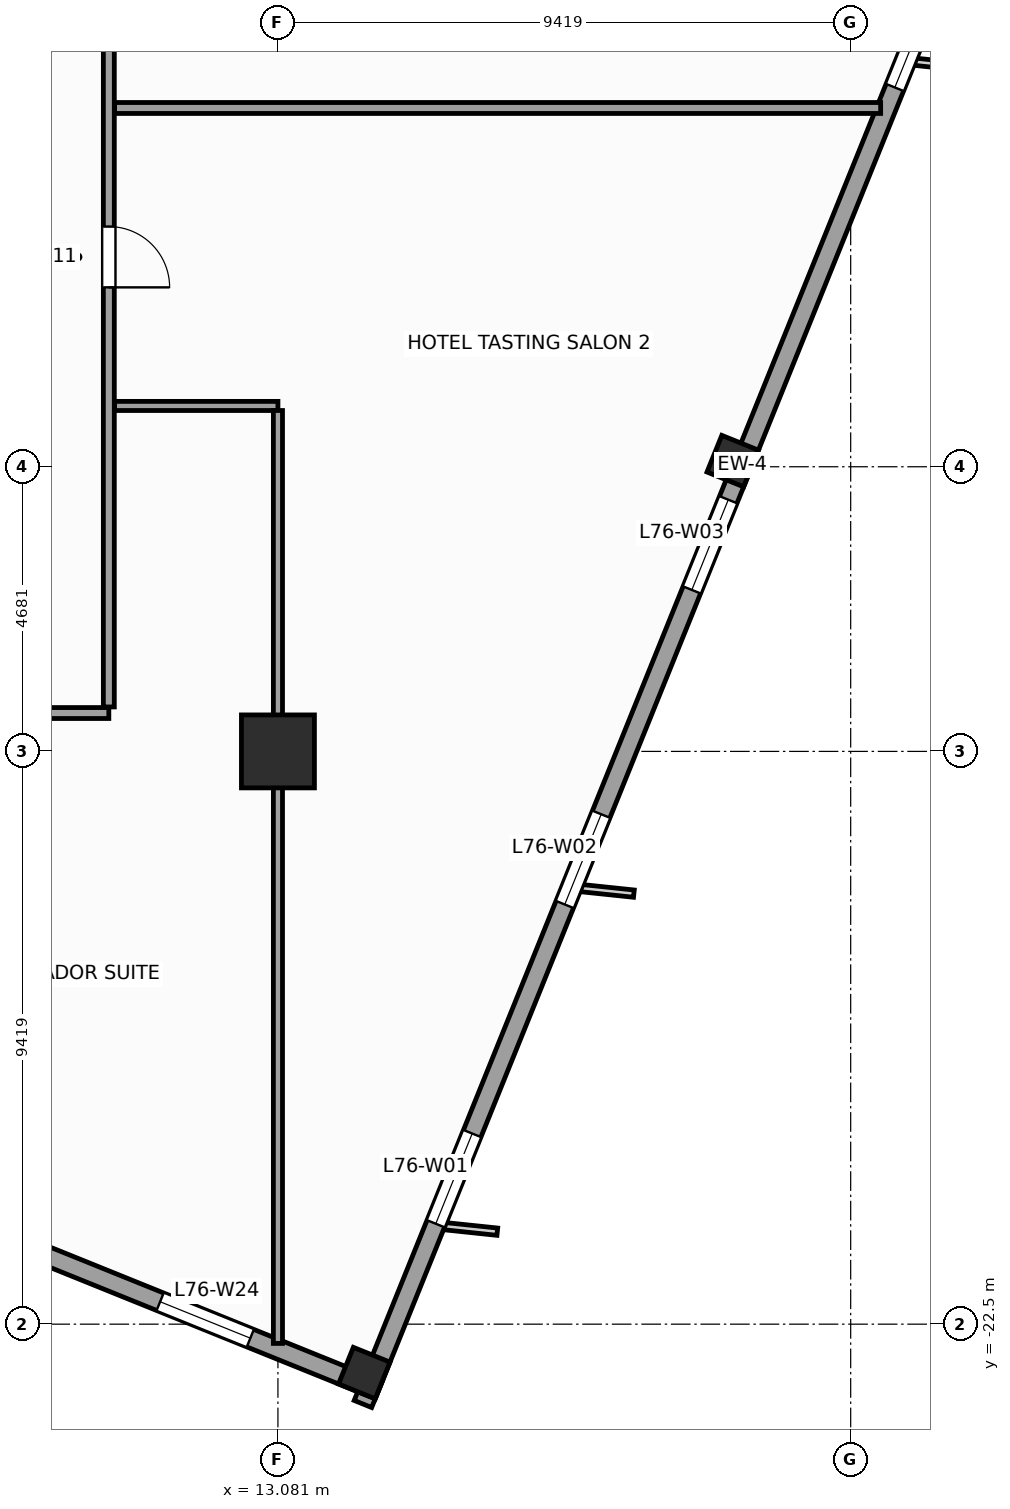
"""IFC4 building model, lengths in metres.
Left out: names, types, materials, properties, quantities, classifications, styles, units other than length and angle.
Written with IfcOpenShell. Run it as: python <this file> out.ifc"""

import sys

from ifc_helpers import new_model, si_unit, direction, frame, frame_2d, origin, origin_2d, place, context, subcontext, project, spatial, rectangle, extrude, source, transform, mapped, element, fill, save


model = new_model("IFC4")
c1 = context("Model", 3, precision=1e-05, world=origin(), true_north=direction((0.0, 1.0)))
c2 = subcontext(c1, "Body", "Model", "MODEL_VIEW")
j1 = project(units=[si_unit("LENGTHUNIT", "METRE"), si_unit("PLANEANGLEUNIT", "RADIAN")], contexts=[c1])
p1 = place(None, origin())
s1 = spatial("IfcSite", under=j1, at=p1, CompositionType="ELEMENT")
p2 = place(p1, origin())
s2 = spatial("IfcBuilding", under=s1, at=p2, CompositionType="ELEMENT")
p3 = place(p2, frame((0.0, 0.0, 308.4)))
s3 = spatial("IfcBuildingStorey", under=s2, at=p3, CompositionType="ELEMENT", Elevation=308.4)
m1 = source(origin(), c2, "Body", "SweptSolid", [
    extrude(rectangle(XDim=1.2, YDim=1.2, at=origin_2d()), origin(), (0.0, 0.0, 1.0), 3.6),
])
p4 = place(p3, frame((13.081, -13.081, 0.0), z_axis=(0.0, 0.0, 1.0), x_axis=(1.0, 0.0, 0.0)))
e1 = element("IfcColumn", 1, at=p4, inside=s3, PredefinedType="COLUMN", context=c2, shape_type="MappedRepresentation", body=[
    mapped(m1, transform((0.0, 0.0, 0.0), scale=1.0)),
])
m2 = source(origin(), c2, "Body", "SweptSolid", [
    extrude(rectangle(XDim=0.65, YDim=0.65, at=origin_2d()), origin(), (0.0, 0.0, 1.0), 3.6),
])
for number, where, z_axis, x_axis in (
    (2, (14.501, -23.304, 0.0), (0.0, 0.0, 1.0), (0.375, 0.927, 0.0)),
    (3, (20.56, -8.307, 0.0), (0.0, 0.0, 1.0), (0.375, 0.927, 0.0)),
):
    element("IfcColumn", number, at=place(p3, frame(where, z_axis=z_axis, x_axis=x_axis)), inside=s3, PredefinedType="COLUMN", context=c2, shape_type="MappedRepresentation", body=[
        mapped(m2, transform((0.0, 0.0, 0.0), scale=1.0)),
    ])
p5 = place(p3, frame((14.479, -23.813, 0.0), z_axis=(0.0, 0.0, 1.0), x_axis=(0.374609557019, 0.927182657188, 0.0)))
e4 = element("IfcWall", 4, at=p5, inside=s3, PredefinedType="STANDARD", context=c2, shape_type="SweptSolid", body=[
    extrude(rectangle(XDim=33.31, YDim=0.31, at=frame_2d((16.655, 0.0))), origin(), (0.0, 0.0, 1.0), 2.75),
])
p6 = place(p5, frame((3.197, 0.0, 0.47)))
e5 = element("IfcOpeningElement", 5, at=p6, cuts=e4, PredefinedType="OPENING", context=c2, shape_type="SweptSolid", body=[
    extrude(rectangle(XDim=1.6, YDim=2.1, at=frame_2d((0.8, 1.05))), frame((0.0, 0.165, 0.0), z_axis=(0.0, -1.0, 0.0), x_axis=(1.0, 0.0, 0.0)), (0.0, 0.0, 1.0), 0.33),
])
p7 = place(p5, frame((8.86, 0.0, 0.47)))
e6 = element("IfcOpeningElement", 6, at=p7, cuts=e4, PredefinedType="OPENING", context=c2, shape_type="SweptSolid", body=[
    extrude(rectangle(XDim=1.6, YDim=2.1, at=frame_2d((0.8, 1.05))), frame((0.0, 0.165, 0.0), z_axis=(0.0, -1.0, 0.0), x_axis=(1.0, 0.0, 0.0)), (0.0, 0.0, 1.0), 0.33),
])
p8 = place(p5, frame((14.439, 0.0, 0.47)))
e7 = element("IfcOpeningElement", 7, at=p8, cuts=e4, PredefinedType="OPENING", context=c2, shape_type="SweptSolid", body=[
    extrude(rectangle(XDim=1.6, YDim=2.1, at=frame_2d((0.8, 1.05))), frame((0.0, 0.165, 0.0), z_axis=(0.0, -1.0, 0.0), x_axis=(1.0, 0.0, 0.0)), (0.0, 0.0, 1.0), 0.33),
])
p9 = place(p5, frame((23.351, 0.0, 0.47)))
e8 = element("IfcOpeningElement", 8, at=p9, cuts=e4, PredefinedType="OPENING", context=c2, shape_type="SweptSolid", body=[
    extrude(rectangle(XDim=1.6, YDim=2.1, at=frame_2d((0.8, 1.05))), frame((0.0, 0.165, 0.0), z_axis=(0.0, -1.0, 0.0), x_axis=(1.0, 0.0, 0.0)), (0.0, 0.0, 1.0), 0.33),
])
p10 = place(p5, frame((26.347, 0.0, 0.47)))
e9 = element("IfcOpeningElement", 9, at=p10, cuts=e4, PredefinedType="OPENING", context=c2, shape_type="SweptSolid", body=[
    extrude(rectangle(XDim=1.6, YDim=2.1, at=frame_2d((0.8, 1.05))), frame((0.0, 0.165, 0.0), z_axis=(0.0, -1.0, 0.0), x_axis=(1.0, 0.0, 0.0)), (0.0, 0.0, 1.0), 0.33),
])
p11 = place(p3, frame((9.032, -21.278, 0.0), z_axis=(0.0, 0.0, 1.0), x_axis=(0.927185411764, -0.374602739196, 0.0)))
e10 = element("IfcWall", 10, at=p11, inside=s3, PredefinedType="STANDARD", context=c2, shape_type="SweptSolid", body=[
    extrude(rectangle(XDim=6.155, YDim=0.31, at=frame_2d((3.078, 0.0))), origin(), (0.0, 0.0, 1.0), 3.35),
])
p12 = place(p11, frame((2.278, 0.0, 0.47)))
e11 = element("IfcOpeningElement", 11, at=p12, cuts=e10, PredefinedType="OPENING", context=c2, shape_type="SweptSolid", body=[
    extrude(rectangle(XDim=1.6, YDim=2.1, at=frame_2d((0.8, 1.05))), frame((0.0, 0.165, 0.0), z_axis=(0.0, -1.0, 0.0), x_axis=(1.0, 0.0, 0.0)), (0.0, 0.0, 1.0), 0.33),
])
p13 = place(p3, frame((-10.3, -12.45, 0.0), z_axis=(0.0, 0.0, 1.0), x_axis=(1.0, 0.0, 0.0)))
e12 = element("IfcWall", 12, at=p13, inside=s3, PredefinedType="PARTITIONING", context=c2, shape_type="SweptSolid", body=[
    extrude(rectangle(XDim=20.6, YDim=0.18, at=frame_2d((10.3, 0.0))), origin(), (0.0, 0.0, 1.0), 3.35),
])
p14 = place(p13, frame((1.605, 0.0, 0.0)))
e13 = element("IfcOpeningElement", 13, at=p14, cuts=e12, PredefinedType="OPENING", context=c2, shape_type="SweptSolid", body=[
    extrude(rectangle(XDim=0.95, YDim=2.1, at=frame_2d((0.475, 1.05))), frame((0.0, 0.1, 0.0), z_axis=(0.0, -1.0, 0.0), x_axis=(1.0, 0.0, 0.0)), (0.0, 0.0, 1.0), 0.2),
])
p15 = place(p13, frame((16.036, 0.0, 0.0)))
e14 = element("IfcOpeningElement", 14, at=p15, cuts=e12, PredefinedType="OPENING", context=c2, shape_type="SweptSolid", body=[
    extrude(rectangle(XDim=1.0, YDim=2.15, at=frame_2d((0.5, 1.075))), frame((0.0, 0.1, 0.0), z_axis=(0.0, -1.0, 0.0), x_axis=(1.0, 0.0, 0.0)), (0.0, 0.0, 1.0), 0.2),
])
p16 = place(p13, frame((9.55, 0.0, 0.0)))
e15 = element("IfcOpeningElement", 15, at=p16, cuts=e12, PredefinedType="OPENING", context=c2, shape_type="SweptSolid", body=[
    extrude(rectangle(XDim=1.0, YDim=2.15, at=frame_2d((0.5, 1.075))), frame((0.0, 0.1, 0.0), z_axis=(0.0, -1.0, 0.0), x_axis=(1.0, 0.0, 0.0)), (0.0, 0.0, 1.0), 0.2),
])
p17 = place(p3, frame((10.3, -12.35, 0.0), z_axis=(0.0, 0.0, 1.0), x_axis=(0.0, 1.0, 0.0)))
e16 = element("IfcWall", 16, at=p17, inside=s3, PredefinedType="PARTITIONING", context=c2, shape_type="SweptSolid", body=[
    extrude(rectangle(XDim=24.7, YDim=0.18, at=frame_2d((12.35, 0.0))), origin(), (0.0, 0.0, 1.0), 3.35),
])
p18 = place(p17, frame((21.561, 0.0, 0.0)))
e17 = element("IfcOpeningElement", 17, at=p18, cuts=e16, PredefinedType="OPENING", context=c2, shape_type="SweptSolid", body=[
    extrude(rectangle(XDim=1.0, YDim=2.15, at=frame_2d((0.5, 1.075))), frame((0.0, 0.1, 0.0), z_axis=(0.0, -1.0, 0.0), x_axis=(1.0, 0.0, 0.0)), (0.0, 0.0, 1.0), 0.2),
])
p19 = place(p17, frame((16.8, 0.0, 0.0)))
e18 = element("IfcOpeningElement", 18, at=p19, cuts=e16, PredefinedType="OPENING", context=c2, shape_type="SweptSolid", body=[
    extrude(rectangle(XDim=1.0, YDim=2.15, at=frame_2d((0.5, 1.075))), frame((0.0, 0.1, 0.0), z_axis=(0.0, -1.0, 0.0), x_axis=(1.0, 0.0, 0.0)), (0.0, 0.0, 1.0), 0.2),
])
p20 = place(p17, frame((11.85, 0.0, 0.0)))
e19 = element("IfcOpeningElement", 19, at=p20, cuts=e16, PredefinedType="OPENING", context=c2, shape_type="SweptSolid", body=[
    extrude(rectangle(XDim=1.0, YDim=2.15, at=frame_2d((0.5, 1.075))), frame((0.0, 0.1, 0.0), z_axis=(0.0, -1.0, 0.0), x_axis=(1.0, 0.0, 0.0)), (0.0, 0.0, 1.0), 0.2),
])
p21 = place(p17, frame((6.9, 0.0, 0.0)))
e20 = element("IfcOpeningElement", 20, at=p21, cuts=e16, PredefinedType="OPENING", context=c2, shape_type="SweptSolid", body=[
    extrude(rectangle(XDim=1.0, YDim=2.15, at=frame_2d((0.5, 1.075))), frame((0.0, 0.1, 0.0), z_axis=(0.0, -1.0, 0.0), x_axis=(1.0, 0.0, 0.0)), (0.0, 0.0, 1.0), 0.2),
])
p22 = place(p3, frame((10.395, -2.5, 0.0), z_axis=(0.0, 0.0, 1.0), x_axis=(1.0, 0.0, 0.0)))
e21 = element("IfcWall", 21, at=p22, inside=s3, PredefinedType="PARTITIONING", context=c2, shape_type="SweptSolid", body=[
    extrude(rectangle(XDim=12.598, YDim=0.18, at=frame_2d((6.299, 0.0))), origin(), (0.0, 0.0, 1.0), 3.35),
])
p23 = place(p3, frame((10.395, -7.4, 0.0), z_axis=(0.0, 0.0, 1.0), x_axis=(1.0, 0.0, 0.0)))
e22 = element("IfcWall", 22, at=p23, inside=s3, PredefinedType="PARTITIONING", context=c2, shape_type="SweptSolid", body=[
    extrude(rectangle(XDim=2.686, YDim=0.15, at=frame_2d((1.343, 0.0))), origin(), (0.0, 0.0, 1.0), 3.35),
])
p24 = place(p3, frame((13.081, -7.475, 0.0), z_axis=(0.0, 0.0, 1.0), x_axis=(0.0, -1.0, 0.0)))
e23 = element("IfcWall", 23, at=p24, inside=s3, PredefinedType="PARTITIONING", context=c2, shape_type="SweptSolid", body=[
    extrude(rectangle(XDim=15.342, YDim=0.15, at=frame_2d((7.671, 0.0))), origin(), (0.0, 0.0, 1.0), 2.45),
])
m3 = source(origin(), c2, "Body", "SweptSolid", [
    extrude(rectangle(XDim=1.6, YDim=2.1, at=frame_2d((0.8, 1.05))), frame((0.0, 0.03, 0.0), z_axis=(0.0, -1.0, 0.0), x_axis=(1.0, 0.0, 0.0)), (0.0, 0.0, 1.0), 0.06),
])
p25 = place(p6, origin())
e24 = element("IfcWindow", 24, at=p25, inside=s3, PartitioningType="SINGLE_PANEL", PredefinedType="WINDOW", context=c2, shape_type="MappedRepresentation", body=[
    mapped(m3, transform((0.0, 0.0, 0.0), scale=1.0)),
])
fill(e5, e24)
p26 = place(p7, origin())
e25 = element("IfcWindow", 25, at=p26, inside=s3, PartitioningType="SINGLE_PANEL", PredefinedType="WINDOW", context=c2, shape_type="MappedRepresentation", body=[
    mapped(m3, transform((0.0, 0.0, 0.0), scale=1.0)),
])
fill(e6, e25)
p27 = place(p8, origin())
e26 = element("IfcWindow", 26, at=p27, inside=s3, PartitioningType="SINGLE_PANEL", PredefinedType="WINDOW", context=c2, shape_type="MappedRepresentation", body=[
    mapped(m3, transform((0.0, 0.0, 0.0), scale=1.0)),
])
fill(e7, e26)
p28 = place(p9, origin())
e27 = element("IfcWindow", 27, at=p28, inside=s3, PartitioningType="SINGLE_PANEL", PredefinedType="WINDOW", context=c2, shape_type="MappedRepresentation", body=[
    mapped(m3, transform((0.0, 0.0, 0.0), scale=1.0)),
])
fill(e8, e27)
p29 = place(p12, origin())
e28 = element("IfcWindow", 28, at=p29, inside=s3, PartitioningType="SINGLE_PANEL", PredefinedType="WINDOW", context=c2, shape_type="MappedRepresentation", body=[
    mapped(m3, transform((0.0, 0.0, 0.0), scale=1.0)),
])
fill(e11, e28)
m4 = source(origin(), c2, "Body", "SweptSolid", [
    extrude(rectangle(XDim=1.0, YDim=2.15, at=frame_2d((0.5, 1.075))), frame((0.0, 0.025, 0.0), z_axis=(0.0, -1.0, 0.0), x_axis=(1.0, 0.0, 0.0)), (0.0, 0.0, 1.0), 0.05),
])
p30 = place(p21, frame((1.0, 0.0, 0.0), z_axis=(0.0, 0.0, 1.0), x_axis=(-1.0, 0.0, 0.0)))
e29 = element("IfcDoor", 29, at=p30, inside=s3, OperationType="SINGLE_SWING_LEFT", PredefinedType="DOOR", context=c2, shape_type="MappedRepresentation", body=[
    mapped(m4, transform((0.0, 0.0, 0.0), scale=1.0)),
])
fill(e20, e29)
save(model, sys.argv[1])
